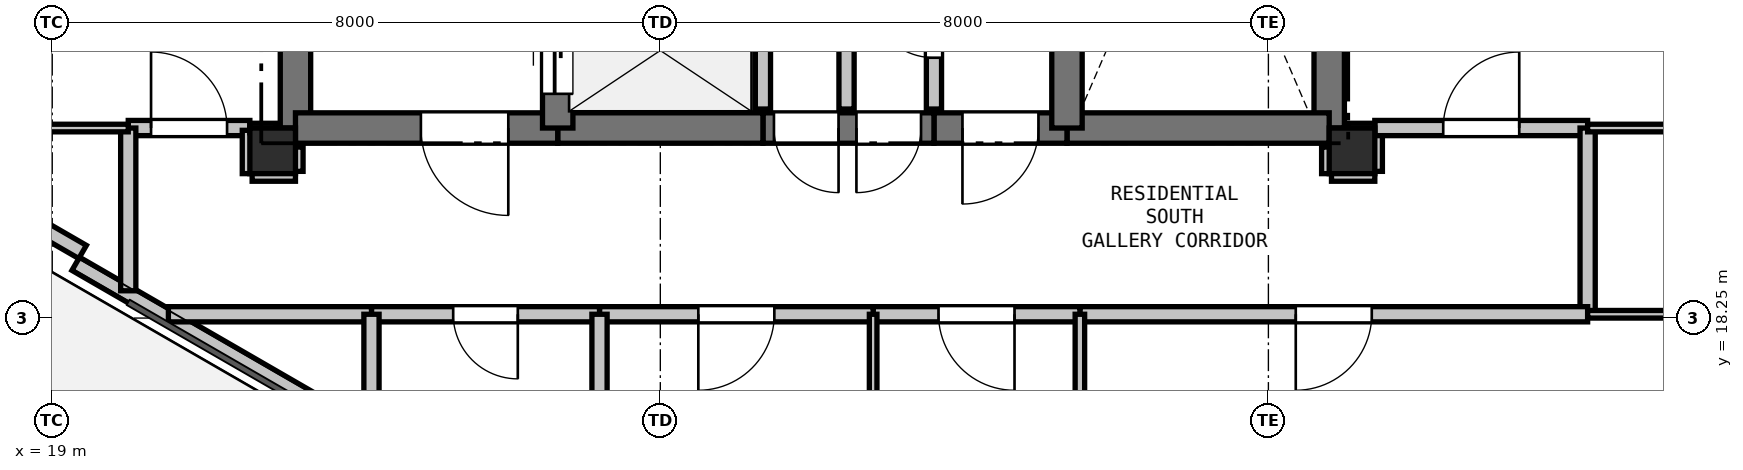
"""IFC4 building model, lengths in metres.
Left out: names, types, materials, properties, quantities, classifications, styles, units other than length and angle.
Written with IfcOpenShell. Run it as: python <this file> out.ifc"""

import sys

from ifc_helpers import new_model, si_unit, direction, frame, frame_2d, origin, origin_2d, place, context, subcontext, project, spatial, rectangle, extrude, element, fill, save


model = new_model("IFC4")
c1 = context("Model", 3, precision=1e-05, world=origin(), true_north=direction((0.0, 1.0)))
c2 = subcontext(c1, "Body", "Model", "MODEL_VIEW")
j1 = project(units=[si_unit("LENGTHUNIT", "METRE"), si_unit("PLANEANGLEUNIT", "RADIAN")], contexts=[c1])
p1 = place(None, origin())
s1 = spatial("IfcSite", under=j1, at=p1, CompositionType="ELEMENT")
p2 = place(p1, origin())
s2 = spatial("IfcBuilding", under=s1, at=p2, CompositionType="ELEMENT")
p3 = place(p2, frame((0.0, 0.0, 215.1)))
s3 = spatial("IfcBuildingStorey", under=s2, at=p3, CompositionType="ELEMENT", Elevation=215.1)
for number, where, z_axis, x_axis in (
    (1, (21.9, 20.45, 0.0), (0.0, 0.0, 1.0), (1.0, 0.0, 0.0)),
    (2, (36.1, 20.45, 0.0), (0.0, 0.0, 1.0), (1.0, 0.0, 0.0)),
):
    element("IfcColumn", number, at=place(p3, frame(where, z_axis=z_axis, x_axis=x_axis)), inside=s3, PredefinedType="COLUMN", context=c2, shape_type="SweptSolid", body=[
        extrude(rectangle(XDim=0.6, YDim=0.6, at=origin_2d()), origin(), (0.0, 0.0, 1.0), 3.3),
    ])
p4 = place(p3, frame((27.102, 14.464, 0.0), z_axis=(0.0, 0.0, 1.0), x_axis=(-0.866020680503, 0.500008180874, 0.0)))
e3 = element("IfcWall", 3, at=p4, inside=s3, PredefinedType="PARAPET", context=c2, shape_type="SweptSolid", body=[
    extrude(rectangle(XDim=8.999, YDim=0.2, at=frame_2d((4.5, 0.0))), origin(), (0.0, 0.0, 1.0), 0.2),
])
p5 = place(p3, frame((19.399, 19.12, 0.0), z_axis=(0.0, 0.0, 1.0), x_axis=(-0.86605165483, 0.499954529098, 0.0)))
e4 = element("IfcWall", 4, at=p5, inside=s3, PredefinedType="PARAPET", context=c2, shape_type="SweptSolid", body=[
    extrude(rectangle(XDim=1.7, YDim=0.2, at=frame_2d((0.85, 0.0))), origin(), (0.0, 0.0, 1.0), 2.64),
])
p6 = place(p3, frame((22.2, 20.75, 0.0), z_axis=(0.0, 0.0, 1.0), x_axis=(0.0, 1.0, 0.0)))
e5 = element("IfcWall", 5, at=p6, inside=s3, PredefinedType="SHEAR", context=c2, shape_type="SweptSolid", body=[
    extrude(rectangle(XDim=4.65, YDim=0.4, at=frame_2d((2.325, 0.0))), origin(), (0.0, 0.0, 1.0), 3.02),
])
p7 = place(p3, frame((35.8, 28.1, 0.0), z_axis=(0.0, 0.0, 1.0), x_axis=(0.0, -1.0, 0.0)))
e6 = element("IfcWall", 6, at=p7, inside=s3, PredefinedType="SHEAR", context=c2, shape_type="SweptSolid", body=[
    extrude(rectangle(XDim=7.35, YDim=0.4, at=frame_2d((3.675, 0.0))), origin(), (0.0, 0.0, 1.0), 3.02),
])
p8 = place(p3, frame((35.8, 20.75, 0.0), z_axis=(0.0, 0.0, 1.0), x_axis=(-1.0, 0.0, 0.0)))
e7 = element("IfcWall", 7, at=p8, inside=s3, PredefinedType="SHEAR", context=c2, shape_type="SweptSolid", body=[
    extrude(rectangle(XDim=3.45, YDim=0.4, at=frame_2d((1.725, 0.0))), origin(), (0.0, 0.0, 1.0), 3.02),
])
p9 = place(p3, frame((32.35, 20.75, 0.0), z_axis=(0.0, 0.0, 1.0), x_axis=(-1.0, 0.0, 0.0)))
e8 = element("IfcWall", 8, at=p9, inside=s3, PredefinedType="SHEAR", context=c2, shape_type="SweptSolid", body=[
    extrude(rectangle(XDim=1.75, YDim=0.4, at=frame_2d((0.875, 0.0))), origin(), (0.0, 0.0, 1.0), 3.02),
])
p10 = place(p9, frame((0.375, 0.0, 0.0)))
e9 = element("IfcOpeningElement", 9, at=p10, cuts=e8, PredefinedType="OPENING", context=c2, shape_type="SweptSolid", body=[
    extrude(rectangle(XDim=1.0, YDim=2.15, at=frame_2d((0.5, 1.075))), frame((0.0, 0.21, 0.0), z_axis=(0.0, -1.0, 0.0), x_axis=(1.0, 0.0, 0.0)), (0.0, 0.0, 1.0), 0.42),
])
p11 = place(p3, frame((30.6, 20.75, 0.0), z_axis=(0.0, 0.0, 1.0), x_axis=(-1.0, 0.0, 0.0)))
e10 = element("IfcWall", 10, at=p11, inside=s3, PredefinedType="SHEAR", context=c2, shape_type="SweptSolid", body=[
    extrude(rectangle(XDim=2.25, YDim=0.4, at=frame_2d((1.125, 0.0))), origin(), (0.0, 0.0, 1.0), 3.02),
])
p12 = place(p11, frame((1.255, 0.0, 0.0)))
e11 = element("IfcOpeningElement", 11, at=p12, cuts=e10, PredefinedType="OPENING", context=c2, shape_type="SweptSolid", body=[
    extrude(rectangle(XDim=0.85, YDim=2.1, at=frame_2d((0.425, 1.05))), frame((0.0, 0.21, 0.0), z_axis=(0.0, -1.0, 0.0), x_axis=(1.0, 0.0, 0.0)), (0.0, 0.0, 1.0), 0.42),
])
p13 = place(p11, frame((0.17, 0.0, 0.0)))
e12 = element("IfcOpeningElement", 12, at=p13, cuts=e10, PredefinedType="OPENING", context=c2, shape_type="SweptSolid", body=[
    extrude(rectangle(XDim=0.85, YDim=2.1, at=frame_2d((0.425, 1.05))), frame((0.0, 0.21, 0.0), z_axis=(0.0, -1.0, 0.0), x_axis=(1.0, 0.0, 0.0)), (0.0, 0.0, 1.0), 0.42),
])
p14 = place(p3, frame((28.35, 20.75, 0.0), z_axis=(0.0, 0.0, 1.0), x_axis=(-1.0, 0.0, 0.0)))
e13 = element("IfcWall", 13, at=p14, inside=s3, PredefinedType="SHEAR", context=c2, shape_type="SweptSolid", body=[
    extrude(rectangle(XDim=2.7, YDim=0.4, at=frame_2d((1.35, 0.0))), origin(), (0.0, 0.0, 1.0), 3.02),
])
p15 = place(p3, frame((25.65, 20.75, 0.0), z_axis=(0.0, 0.0, 1.0), x_axis=(-1.0, 0.0, 0.0)))
e14 = element("IfcWall", 14, at=p15, inside=s3, PredefinedType="SHEAR", context=c2, shape_type="SweptSolid", body=[
    extrude(rectangle(XDim=3.45, YDim=0.4, at=frame_2d((1.725, 0.0))), origin(), (0.0, 0.0, 1.0), 3.02),
])
p16 = place(p15, frame((0.65, 0.0, 0.0)))
e15 = element("IfcOpeningElement", 15, at=p16, cuts=e14, PredefinedType="OPENING", context=c2, shape_type="SweptSolid", body=[
    extrude(rectangle(XDim=1.15, YDim=2.15, at=frame_2d((0.575, 1.075))), frame((0.0, 0.21, 0.0), z_axis=(0.0, -1.0, 0.0), x_axis=(1.0, 0.0, 0.0)), (0.0, 0.0, 1.0), 0.42),
])
p17 = place(p3, frame((25.65, 20.75, 0.0), z_axis=(0.0, 0.0, 1.0), x_axis=(0.0, 1.0, 0.0)))
e16 = element("IfcWall", 16, at=p17, inside=s3, PredefinedType="SHEAR", context=c2, shape_type="SweptSolid", body=[
    extrude(rectangle(XDim=2.0, YDim=0.4, at=frame_2d((1.0, 0.0))), origin(), (0.0, 0.0, 1.0), 3.02),
])
p18 = place(p17, frame((0.45, 0.0, 0.0)))
e17 = element("IfcOpeningElement", 17, at=p18, cuts=e16, PredefinedType="OPENING", context=c2, shape_type="SweptSolid", body=[
    extrude(rectangle(XDim=1.1, YDim=2.15, at=frame_2d((0.55, 1.075))), frame((0.0, 0.21, 0.0), z_axis=(0.0, -1.0, 0.0), x_axis=(1.0, 0.0, 0.0)), (0.0, 0.0, 1.0), 0.42),
])
p19 = place(p3, frame((32.35, 20.75, 0.0), z_axis=(0.0, 0.0, 1.0), x_axis=(0.0, 1.0, 0.0)))
e18 = element("IfcWall", 18, at=p19, inside=s3, PredefinedType="SHEAR", context=c2, shape_type="SweptSolid", body=[
    extrude(rectangle(XDim=4.8, YDim=0.4, at=frame_2d((2.4, 0.0))), origin(), (0.0, 0.0, 1.0), 3.02),
])
p20 = place(p3, frame((28.35, 23.2, 0.0), z_axis=(0.0, 0.0, 1.0), x_axis=(0.0, -1.0, 0.0)))
e19 = element("IfcWall", 19, at=p20, inside=s3, PredefinedType="PARTITIONING", context=c2, shape_type="SweptSolid", body=[
    extrude(rectangle(XDim=2.2, YDim=0.2, at=frame_2d((1.1, 0.0))), origin(), (0.0, 0.0, 1.0), 3.02),
])
p21 = place(p3, frame((30.6, 21.0, 0.0), z_axis=(0.0, 0.0, 1.0), x_axis=(0.0, 1.0, 0.0)))
e20 = element("IfcWall", 20, at=p21, inside=s3, PredefinedType="PARTITIONING", context=c2, shape_type="SweptSolid", body=[
    extrude(rectangle(XDim=2.2, YDim=0.2, at=frame_2d((1.1, 0.0))), origin(), (0.0, 0.0, 1.0), 3.02),
])
p22 = place(p21, frame((0.675, 0.0, 0.0)))
e21 = element("IfcOpeningElement", 21, at=p22, cuts=e20, PredefinedType="OPENING", context=c2, shape_type="SweptSolid", body=[
    extrude(rectangle(XDim=0.85, YDim=2.1, at=frame_2d((0.425, 1.05))), frame((0.0, 0.11, 0.0), z_axis=(0.0, -1.0, 0.0), x_axis=(1.0, 0.0, 0.0)), (0.0, 0.0, 1.0), 0.22),
])
p23 = place(p3, frame((20.0, 20.75, 0.0), z_axis=(0.0, 0.0, 1.0), x_axis=(1.0, 0.0, 0.0)))
e22 = element("IfcWall", 22, at=p23, inside=s3, PredefinedType="PARTITIONING", context=c2, shape_type="SweptSolid", body=[
    extrude(rectangle(XDim=1.6, YDim=0.2, at=frame_2d((0.8, 0.0))), origin(), (0.0, 0.0, 1.0), 2.468),
])
p24 = place(p23, frame((0.3, 0.0, 0.0)))
e23 = element("IfcOpeningElement", 23, at=p24, cuts=e22, PredefinedType="OPENING", context=c2, shape_type="SweptSolid", body=[
    extrude(rectangle(XDim=1.0, YDim=2.15, at=frame_2d((0.5, 1.075))), frame((0.0, 0.11, 0.0), z_axis=(0.0, -1.0, 0.0), x_axis=(1.0, 0.0, 0.0)), (0.0, 0.0, 1.0), 0.22),
])
for number, where, z_axis, x_axis in (
    (24, (21.6, 20.72, 0.0), (0.0, 0.0, 1.0), (0.0, -1.0, 0.0)),
    (25, (21.63, 20.15, 0.0), (0.0, 0.0, 1.0), (1.0, 0.0, 0.0)),
):
    element("IfcWall", number, at=place(p3, frame(where, z_axis=z_axis, x_axis=x_axis)), inside=s3, PredefinedType="PARTITIONING", context=c2, shape_type="SweptSolid", body=[
        extrude(rectangle(XDim=0.57, YDim=0.2, at=frame_2d((0.285, 0.0))), origin(), (0.0, 0.0, 1.0), 2.468),
    ])
p25 = place(p3, frame((22.2, 20.18, 0.0), z_axis=(0.0, 0.0, 1.0), x_axis=(0.0, 1.0, 0.0)))
e26 = element("IfcWall", 26, at=p25, inside=s3, PredefinedType="PARTITIONING", context=c2, shape_type="SweptSolid", body=[
    extrude(rectangle(XDim=0.32, YDim=0.2, at=frame_2d((0.16, 0.0))), origin(), (0.0, 0.0, 1.0), 2.468),
])
p26 = place(p3, frame((35.8, 20.5, 0.0), z_axis=(0.0, 0.0, 1.0), x_axis=(0.0, -1.0, 0.0)))
e27 = element("IfcWall", 27, at=p26, inside=s3, PredefinedType="PARTITIONING", context=c2, shape_type="SweptSolid", body=[
    extrude(rectangle(XDim=0.35, YDim=0.2, at=frame_2d((0.175, 0.0))), origin(), (0.0, 0.0, 1.0), 2.545),
])
p27 = place(p3, frame((35.83, 20.15, 0.0), z_axis=(0.0, 0.0, 1.0), x_axis=(1.0, 0.0, 0.0)))
e28 = element("IfcWall", 28, at=p27, inside=s3, PredefinedType="PARTITIONING", context=c2, shape_type="SweptSolid", body=[
    extrude(rectangle(XDim=0.57, YDim=0.2, at=frame_2d((0.285, 0.0))), origin(), (0.0, 0.0, 1.0), 2.468),
])
p28 = place(p3, frame((36.4, 20.18, 0.0), z_axis=(0.0, 0.0, 1.0), x_axis=(0.0, 1.0, 0.0)))
e29 = element("IfcWall", 29, at=p28, inside=s3, PredefinedType="PARTITIONING", context=c2, shape_type="SweptSolid", body=[
    extrude(rectangle(XDim=0.57, YDim=0.2, at=frame_2d((0.285, 0.0))), origin(), (0.0, 0.0, 1.0), 3.02),
])
p29 = place(p3, frame((36.4, 20.75, 0.0), z_axis=(0.0, 0.0, 1.0), x_axis=(1.0, 0.0, 0.0)))
e30 = element("IfcWall", 30, at=p29, inside=s3, PredefinedType="PARTITIONING", context=c2, shape_type="SweptSolid", body=[
    extrude(rectangle(XDim=2.8, YDim=0.2, at=frame_2d((1.4, 0.0))), origin(), (0.0, 0.0, 1.0), 3.02),
])
p30 = place(p29, frame((0.9, 0.0, 0.0)))
e31 = element("IfcOpeningElement", 31, at=p30, cuts=e30, PredefinedType="OPENING", context=c2, shape_type="SweptSolid", body=[
    extrude(rectangle(XDim=1.0, YDim=2.15, at=frame_2d((0.5, 1.075))), frame((0.0, 0.11, 0.0), z_axis=(0.0, -1.0, 0.0), x_axis=(1.0, 0.0, 0.0)), (0.0, 0.0, 1.0), 0.22),
])
p31 = place(p3, frame((39.2, 20.75, 0.0), z_axis=(0.0, 0.0, 1.0), x_axis=(0.0, -1.0, 0.0)))
e32 = element("IfcWall", 32, at=p31, inside=s3, PredefinedType="PARTITIONING", context=c2, shape_type="SweptSolid", body=[
    extrude(rectangle(XDim=2.45, YDim=0.2, at=frame_2d((1.225, 0.0))), origin(), (0.0, 0.0, 1.0), 3.02),
])
p32 = place(p3, frame((39.2, 18.3, 0.0), z_axis=(0.0, 0.0, 1.0), x_axis=(-1.0, 0.0, 0.0)))
e33 = element("IfcWall", 33, at=p32, inside=s3, PredefinedType="PARTITIONING", context=c2, shape_type="SweptSolid", body=[
    extrude(rectangle(XDim=6.68, YDim=0.2, at=frame_2d((3.34, 0.0))), origin(), (0.0, 0.0, 1.0), 2.468),
])
p33 = place(p32, frame((2.84, 0.0, 0.0)))
e34 = element("IfcOpeningElement", 34, at=p33, cuts=e33, PredefinedType="OPENING", context=c2, shape_type="SweptSolid", body=[
    extrude(rectangle(XDim=1.0, YDim=2.15, at=frame_2d((0.5, 1.075))), frame((0.0, 0.11, 0.0), z_axis=(0.0, -1.0, 0.0), x_axis=(1.0, 0.0, 0.0)), (0.0, 0.0, 1.0), 0.22),
])
p34 = place(p3, frame((32.52, 18.3, 0.0), z_axis=(0.0, 0.0, 1.0), x_axis=(-1.0, 0.0, 0.0)))
e35 = element("IfcWall", 35, at=p34, inside=s3, PredefinedType="PARTITIONING", context=c2, shape_type="SweptSolid", body=[
    extrude(rectangle(XDim=2.72, YDim=0.2, at=frame_2d((1.36, 0.0))), origin(), (0.0, 0.0, 1.0), 3.02),
])
p35 = place(p34, frame((0.86, 0.0, 0.0)))
e36 = element("IfcOpeningElement", 36, at=p35, cuts=e35, PredefinedType="OPENING", context=c2, shape_type="SweptSolid", body=[
    extrude(rectangle(XDim=1.0, YDim=2.15, at=frame_2d((0.5, 1.075))), frame((0.0, 0.11, 0.0), z_axis=(0.0, -1.0, 0.0), x_axis=(1.0, 0.0, 0.0)), (0.0, 0.0, 1.0), 0.22),
])
p36 = place(p3, frame((29.8, 18.3, 0.0), z_axis=(0.0, 0.0, 1.0), x_axis=(-1.0, 0.0, 0.0)))
e37 = element("IfcWall", 37, at=p36, inside=s3, PredefinedType="PARTITIONING", context=c2, shape_type="SweptSolid", body=[
    extrude(rectangle(XDim=3.6, YDim=0.2, at=frame_2d((1.8, 0.0))), origin(), (0.0, 0.0, 1.0), 3.02),
])
p37 = place(p36, frame((1.3, 0.0, 0.0)))
e38 = element("IfcOpeningElement", 38, at=p37, cuts=e37, PredefinedType="OPENING", context=c2, shape_type="SweptSolid", body=[
    extrude(rectangle(XDim=1.0, YDim=2.15, at=frame_2d((0.5, 1.075))), frame((0.0, 0.11, 0.0), z_axis=(0.0, -1.0, 0.0), x_axis=(1.0, 0.0, 0.0)), (0.0, 0.0, 1.0), 0.22),
])
p38 = place(p3, frame((26.2, 18.3, 0.0), z_axis=(0.0, 0.0, 1.0), x_axis=(-1.0, 0.0, 0.0)))
e39 = element("IfcWall", 39, at=p38, inside=s3, PredefinedType="PARTITIONING", context=c2, shape_type="SweptSolid", body=[
    extrude(rectangle(XDim=3.0, YDim=0.2, at=frame_2d((1.5, 0.0))), origin(), (0.0, 0.0, 1.0), 2.468),
])
p39 = place(p38, frame((1.075, 0.0, 0.0)))
e40 = element("IfcOpeningElement", 40, at=p39, cuts=e39, PredefinedType="OPENING", context=c2, shape_type="SweptSolid", body=[
    extrude(rectangle(XDim=0.85, YDim=2.1, at=frame_2d((0.425, 1.05))), frame((0.0, 0.11, 0.0), z_axis=(0.0, -1.0, 0.0), x_axis=(1.0, 0.0, 0.0)), (0.0, 0.0, 1.0), 0.22),
])
p40 = place(p3, frame((23.2, 18.3, 0.0), z_axis=(0.0, 0.0, 1.0), x_axis=(-1.0, 0.0, 0.0)))
e41 = element("IfcWall", 41, at=p40, inside=s3, PredefinedType="PARTITIONING", context=c2, shape_type="SweptSolid", body=[
    extrude(rectangle(XDim=2.672, YDim=0.2, at=frame_2d((1.336, 0.0))), origin(), (0.0, 0.0, 1.0), 2.365),
])
p41 = place(p3, frame((20.0, 18.609, 0.0), z_axis=(0.0, 0.0, 1.0), x_axis=(0.0, 1.0, 0.0)))
e42 = element("IfcWall", 42, at=p41, inside=s3, PredefinedType="PARTITIONING", context=c2, shape_type="SweptSolid", body=[
    extrude(rectangle(XDim=2.141, YDim=0.2, at=frame_2d((1.071, 0.0))), origin(), (0.0, 0.0, 1.0), 2.365),
])
p42 = place(p3, frame((29.45, 23.2, 0.0), z_axis=(0.0, 0.0, 1.0), x_axis=(0.0, -1.0, 0.0)))
e43 = element("IfcWall", 43, at=p42, inside=s3, PredefinedType="PARTITIONING", context=c2, shape_type="SweptSolid", body=[
    extrude(rectangle(XDim=2.2, YDim=0.2, at=frame_2d((1.1, 0.0))), origin(), (0.0, 0.0, 1.0), 3.02),
])
p43 = place(p3, frame((21.95, 20.75, 0.0), z_axis=(0.0, 0.0, 1.0), x_axis=(-1.0, 0.0, 0.0)))
e44 = element("IfcWall", 44, at=p43, inside=s3, PredefinedType="PARTITIONING", context=c2, shape_type="SweptSolid", body=[
    extrude(rectangle(XDim=0.35, YDim=0.125, at=frame_2d((0.175, 0.0))), origin(), (0.0, 0.0, 1.0), 2.545),
])
p44 = place(p3, frame((20.0, 20.75, 0.0), z_axis=(0.0, 0.0, 1.0), x_axis=(-1.0, 0.0, 0.0)))
e45 = element("IfcWall", 45, at=p44, inside=s3, PredefinedType="PARTITIONING", context=c2, shape_type="SweptSolid", body=[
    extrude(rectangle(XDim=3.536, YDim=0.1, at=frame_2d((1.768, 0.0))), origin(), (0.0, 0.0, 1.0), 2.365),
])
p45 = place(p3, frame((40.284, 20.75, 0.0), z_axis=(0.0, 0.0, 1.0), x_axis=(-1.0, 0.0, 0.0)))
e46 = element("IfcWall", 46, at=p45, inside=s3, PredefinedType="PARTITIONING", context=c2, shape_type="SweptSolid", body=[
    extrude(rectangle(XDim=1.084, YDim=0.1, at=frame_2d((0.542, 0.0))), origin(), (0.0, 0.0, 1.0), 2.365),
])
p46 = place(p3, frame((36.4, 20.75, 0.0), z_axis=(0.0, 0.0, 1.0), x_axis=(-1.0, 0.0, 0.0)))
e47 = element("IfcWall", 47, at=p46, inside=s3, PredefinedType="PARTITIONING", context=c2, shape_type="SweptSolid", body=[
    extrude(rectangle(XDim=0.35, YDim=0.125, at=frame_2d((0.175, 0.0))), origin(), (0.0, 0.0, 1.0), 2.545),
])
p47 = place(p3, frame((26.2, 18.3, 0.0), z_axis=(0.0, 0.0, 1.0), x_axis=(0.0, -1.0, 0.0)))
e48 = element("IfcWall", 48, at=p47, inside=s3, PredefinedType="PARTITIONING", context=c2, shape_type="SweptSolid", body=[
    extrude(rectangle(XDim=2.3, YDim=0.2, at=frame_2d((1.15, 0.0))), origin(), (0.0, 0.0, 1.0), 2.468),
])
p48 = place(p3, frame((23.2, 16.761, 0.0), z_axis=(0.0, 0.0, 1.0), x_axis=(0.0, 1.0, 0.0)))
e49 = element("IfcWall", 49, at=p48, inside=s3, PredefinedType="PARTITIONING", context=c2, shape_type="SweptSolid", body=[
    extrude(rectangle(XDim=1.539, YDim=0.2, at=frame_2d((0.769, 0.0))), origin(), (0.0, 0.0, 1.0), 2.365),
])
p49 = place(p3, frame((29.8, 18.3, 0.0), z_axis=(0.0, 0.0, 1.0), x_axis=(0.0, -1.0, 0.0)))
e50 = element("IfcWall", 50, at=p49, inside=s3, PredefinedType="PARTITIONING", context=c2, shape_type="SweptSolid", body=[
    extrude(rectangle(XDim=2.3, YDim=0.1, at=frame_2d((1.15, 0.0))), origin(), (0.0, 0.0, 1.0), 3.02),
])
p50 = place(p3, frame((32.52, 18.3, 0.0), z_axis=(0.0, 0.0, 1.0), x_axis=(0.0, -1.0, 0.0)))
e51 = element("IfcWall", 51, at=p50, inside=s3, PredefinedType="PARTITIONING", context=c2, shape_type="SweptSolid", body=[
    extrude(rectangle(XDim=6.806, YDim=0.125, at=frame_2d((3.403, 0.0))), origin(), (0.0, 0.0, 1.0), 2.365),
])
p51 = place(p3, frame((39.2, 18.3, 0.0), z_axis=(0.0, 0.0, 1.0), x_axis=(1.0, 0.0, 0.0)))
e52 = element("IfcWall", 52, at=p51, inside=s3, PredefinedType="PARTITIONING", context=c2, shape_type="SweptSolid", body=[
    extrude(rectangle(XDim=1.252, YDim=0.1, at=frame_2d((0.626, 0.0))), origin(), (0.0, 0.0, 1.0), 2.365),
])
p52 = place(p10, origin())
e53 = element("IfcDoor", 53, at=p52, inside=s3, OperationType="SINGLE_SWING_RIGHT", PredefinedType="DOOR", context=c2, shape_type="SweptSolid", body=[
    extrude(rectangle(XDim=1.0, YDim=2.15, at=frame_2d((0.5, 1.075))), frame((0.0, 0.025, 0.0), z_axis=(0.0, -1.0, 0.0), x_axis=(1.0, 0.0, 0.0)), (0.0, 0.0, 1.0), 0.05),
])
fill(e9, e53)
p53 = place(p18, origin())
e54 = element("IfcDoor", 54, at=p53, inside=s3, OperationType="SLIDING_TO_LEFT", PredefinedType="DOOR", context=c2, shape_type="SweptSolid", body=[
    extrude(rectangle(XDim=1.1, YDim=2.15, at=frame_2d((0.55, 1.075))), frame((0.0, 0.025, 0.0), z_axis=(0.0, -1.0, 0.0), x_axis=(1.0, 0.0, 0.0)), (0.0, 0.0, 1.0), 0.05),
])
fill(e17, e54)
p54 = place(p16, origin())
e55 = element("IfcDoor", 55, at=p54, inside=s3, OperationType="SINGLE_SWING_LEFT", PredefinedType="DOOR", context=c2, shape_type="SweptSolid", body=[
    extrude(rectangle(XDim=1.15, YDim=2.15, at=frame_2d((0.575, 1.075))), frame((0.0, 0.025, 0.0), z_axis=(0.0, -1.0, 0.0), x_axis=(1.0, 0.0, 0.0)), (0.0, 0.0, 1.0), 0.05),
])
fill(e15, e55)
p55 = place(p22, origin())
e56 = element("IfcDoor", 56, at=p55, inside=s3, OperationType="SINGLE_SWING_RIGHT", PredefinedType="DOOR", context=c2, shape_type="SweptSolid", body=[
    extrude(rectangle(XDim=0.85, YDim=2.1, at=frame_2d((0.425, 1.05))), frame((0.0, 0.025, 0.0), z_axis=(0.0, -1.0, 0.0), x_axis=(1.0, 0.0, 0.0)), (0.0, 0.0, 1.0), 0.05),
])
fill(e21, e56)
p56 = place(p12, origin())
e57 = element("IfcDoor", 57, at=p56, inside=s3, OperationType="SINGLE_SWING_LEFT", PredefinedType="DOOR", context=c2, shape_type="SweptSolid", body=[
    extrude(rectangle(XDim=0.85, YDim=2.1, at=frame_2d((0.425, 1.05))), frame((0.0, 0.025, 0.0), z_axis=(0.0, -1.0, 0.0), x_axis=(1.0, 0.0, 0.0)), (0.0, 0.0, 1.0), 0.05),
])
fill(e11, e57)
p57 = place(p13, origin())
e58 = element("IfcDoor", 58, at=p57, inside=s3, OperationType="SINGLE_SWING_RIGHT", PredefinedType="DOOR", context=c2, shape_type="SweptSolid", body=[
    extrude(rectangle(XDim=0.85, YDim=2.1, at=frame_2d((0.425, 1.05))), frame((0.0, 0.025, 0.0), z_axis=(0.0, -1.0, 0.0), x_axis=(1.0, 0.0, 0.0)), (0.0, 0.0, 1.0), 0.05),
])
fill(e12, e58)
p58 = place(p24, origin())
e59 = element("IfcDoor", 59, at=p58, inside=s3, OperationType="SINGLE_SWING_LEFT", PredefinedType="DOOR", context=c2, shape_type="SweptSolid", body=[
    extrude(rectangle(XDim=1.0, YDim=2.15, at=frame_2d((0.5, 1.075))), frame((0.0, 0.025, 0.0), z_axis=(0.0, -1.0, 0.0), x_axis=(1.0, 0.0, 0.0)), (0.0, 0.0, 1.0), 0.05),
])
fill(e23, e59)
p59 = place(p30, origin())
e60 = element("IfcDoor", 60, at=p59, inside=s3, OperationType="SINGLE_SWING_RIGHT", PredefinedType="DOOR", context=c2, shape_type="SweptSolid", body=[
    extrude(rectangle(XDim=1.0, YDim=2.15, at=frame_2d((0.5, 1.075))), frame((0.0, 0.025, 0.0), z_axis=(0.0, -1.0, 0.0), x_axis=(1.0, 0.0, 0.0)), (0.0, 0.0, 1.0), 0.05),
])
fill(e31, e60)
p60 = place(p39, origin())
e61 = element("IfcDoor", 61, at=p60, inside=s3, OperationType="SINGLE_SWING_LEFT", PredefinedType="DOOR", context=c2, shape_type="SweptSolid", body=[
    extrude(rectangle(XDim=0.85, YDim=2.1, at=frame_2d((0.425, 1.05))), frame((0.0, 0.025, 0.0), z_axis=(0.0, -1.0, 0.0), x_axis=(1.0, 0.0, 0.0)), (0.0, 0.0, 1.0), 0.05),
])
fill(e40, e61)
p61 = place(p37, origin())
e62 = element("IfcDoor", 62, at=p61, inside=s3, OperationType="SINGLE_SWING_RIGHT", PredefinedType="DOOR", context=c2, shape_type="SweptSolid", body=[
    extrude(rectangle(XDim=1.0, YDim=2.15, at=frame_2d((0.5, 1.075))), frame((0.0, 0.025, 0.0), z_axis=(0.0, -1.0, 0.0), x_axis=(1.0, 0.0, 0.0)), (0.0, 0.0, 1.0), 0.05),
])
fill(e38, e62)
p62 = place(p35, origin())
e63 = element("IfcDoor", 63, at=p62, inside=s3, OperationType="SINGLE_SWING_LEFT", PredefinedType="DOOR", context=c2, shape_type="SweptSolid", body=[
    extrude(rectangle(XDim=1.0, YDim=2.15, at=frame_2d((0.5, 1.075))), frame((0.0, 0.025, 0.0), z_axis=(0.0, -1.0, 0.0), x_axis=(1.0, 0.0, 0.0)), (0.0, 0.0, 1.0), 0.05),
])
fill(e36, e63)
p63 = place(p33, origin())
e64 = element("IfcDoor", 64, at=p63, inside=s3, OperationType="SINGLE_SWING_RIGHT", PredefinedType="DOOR", context=c2, shape_type="SweptSolid", body=[
    extrude(rectangle(XDim=1.0, YDim=2.15, at=frame_2d((0.5, 1.075))), frame((0.0, 0.025, 0.0), z_axis=(0.0, -1.0, 0.0), x_axis=(1.0, 0.0, 0.0)), (0.0, 0.0, 1.0), 0.05),
])
fill(e34, e64)
save(model, sys.argv[1])
